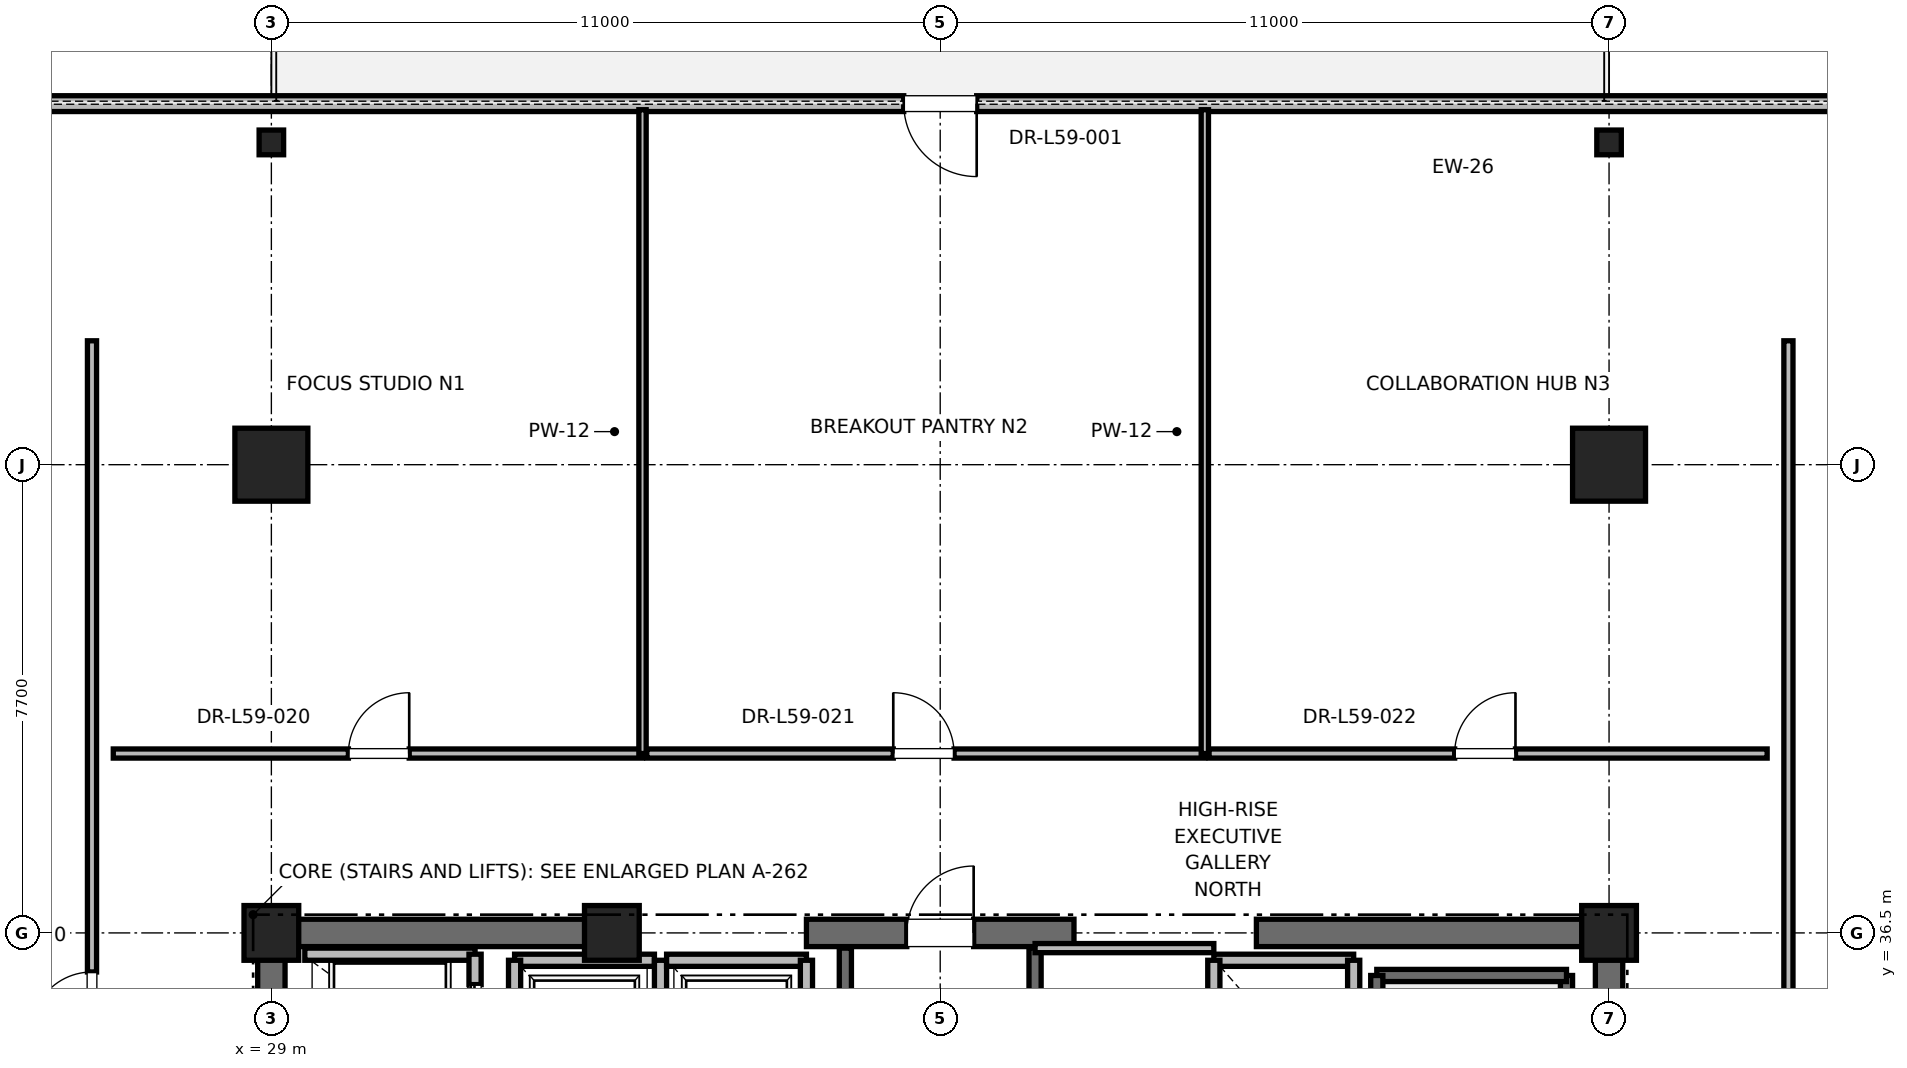
"""IFC4 building model, lengths in metres.
Left out: names, types, materials, properties, quantities, classifications, styles, units other than length and angle.
Written with IfcOpenShell. Run it as: python <this file> out.ifc"""

import sys

from ifc_helpers import new_model, si_unit, direction, frame, frame_2d, origin, origin_2d, place, context, subcontext, project, spatial, rectangle, i_section, extrude, element, fill, save


model = new_model("IFC4")
c1 = context("Model", 3, precision=1e-05, world=origin(), true_north=direction((0.0, 1.0)))
c2 = subcontext(c1, "Body", "Model", "MODEL_VIEW")
j1 = project(units=[si_unit("LENGTHUNIT", "METRE"), si_unit("PLANEANGLEUNIT", "RADIAN")], contexts=[c1])
p1 = place(None, origin())
s1 = spatial("IfcSite", under=j1, at=p1, CompositionType="ELEMENT")
p2 = place(p1, origin())
s2 = spatial("IfcBuilding", under=s1, at=p2, CompositionType="ELEMENT")
p3 = place(p2, frame((0.0, 0.0, 255.2)))
s3 = spatial("IfcBuildingStorey", under=s2, at=p3, CompositionType="ELEMENT", Elevation=255.2)
for number, where, z_axis, x_axis in (
    (1, (29.0, 44.2, 0.0), (0.0, 0.0, 1.0), (1.0, 0.0, 0.0)),
    (2, (51.0, 44.2, 0.0), (0.0, 0.0, 1.0), (1.0, 0.0, 0.0)),
):
    element("IfcColumn", number, at=place(p3, frame(where, z_axis=z_axis, x_axis=x_axis)), inside=s3, PredefinedType="COLUMN", context=c2, shape_type="SweptSolid", body=[
        extrude(rectangle(XDim=1.2, YDim=1.2, at=origin_2d()), origin(), (0.0, 0.0, 1.0), 4.0),
    ])
for number, where, z_axis, x_axis in (
    (3, (29.0, 49.5, 0.0), (0.0, 0.0, 1.0), (1.0, 0.0, 0.0)),
    (4, (51.0, 49.5, 0.0), (0.0, 0.0, 1.0), (1.0, 0.0, 0.0)),
):
    element("IfcColumn", number, at=place(p3, frame(where, z_axis=z_axis, x_axis=x_axis)), inside=s3, PredefinedType="COLUMN", context=c2, shape_type="SweptSolid", body=[
        extrude(i_section(OverallWidth=0.403, OverallDepth=0.406, WebThickness=0.027, FlangeThickness=0.043, FilletRadius=0.015, at=origin_2d()), origin(), (0.0, 0.0, 1.0), 4.0),
    ])
for number, where, z_axis, x_axis in (
    (5, (29.0, 36.5, 0.0), (0.0, 0.0, 1.0), (1.0, 0.0, 0.0)),
    (6, (51.0, 36.5, 0.0), (0.0, 0.0, 1.0), (1.0, 0.0, 0.0)),
    (7, (34.6, 36.5, 0.0), (0.0, 0.0, 1.0), (1.0, 0.0, 0.0)),
):
    element("IfcColumn", number, at=place(p3, frame(where, z_axis=z_axis, x_axis=x_axis)), inside=s3, PredefinedType="PILASTER", context=c2, shape_type="SweptSolid", body=[
        extrude(rectangle(XDim=0.9, YDim=0.9, at=origin_2d()), origin(), (0.0, 0.0, 1.0), 4.0),
    ])
p4 = place(p3, frame((29.0, 36.5, 0.0), z_axis=(0.0, 0.0, 1.0), x_axis=(1.0, 0.0, 0.0)))
e8 = element("IfcWall", 8, at=p4, inside=s3, PredefinedType="SHEAR", context=c2, shape_type="SweptSolid", body=[
    extrude(rectangle(XDim=5.8, YDim=0.45, at=frame_2d((2.9, 0.0))), origin(), (0.0, 0.0, 1.0), 3.785),
])
p5 = place(p3, frame((37.8, 36.5, 0.0), z_axis=(0.0, 0.0, 1.0), x_axis=(1.0, 0.0, 0.0)))
e9 = element("IfcWall", 9, at=p5, inside=s3, PredefinedType="SHEAR", context=c2, shape_type="SweptSolid", body=[
    extrude(rectangle(XDim=4.4, YDim=0.45, at=frame_2d((2.2, 0.0))), origin(), (0.0, 0.0, 1.0), 3.785),
])
p6 = place(p5, frame((1.65, 0.0, 0.0)))
e10 = element("IfcOpeningElement", 10, at=p6, cuts=e9, PredefinedType="OPENING", context=c2, shape_type="SweptSolid", body=[
    extrude(rectangle(XDim=1.1, YDim=2.15, at=frame_2d((0.55, 1.075))), frame((0.0, 0.225, 0.0), z_axis=(0.0, -1.0, 0.0), x_axis=(1.0, 0.0, 0.0)), (0.0, 0.0, 1.0), 0.45),
])
for number, where, z_axis, x_axis in (
    (11, (45.2, 36.5, 0.0), (0.0, 0.0, 1.0), (1.0, 0.0, 0.0)),
    (12, (29.0, 30.7, 0.0), (0.0, 0.0, 1.0), (0.0, 1.0, 0.0)),
):
    element("IfcWall", number, at=place(p3, frame(where, z_axis=z_axis, x_axis=x_axis)), inside=s3, PredefinedType="SHEAR", context=c2, shape_type="SweptSolid", body=[
        extrude(rectangle(XDim=5.8, YDim=0.45, at=frame_2d((2.9, 0.0))), origin(), (0.0, 0.0, 1.0), 3.785),
    ])
p7 = place(p3, frame((51.0, 27.7, 0.0), z_axis=(0.0, 0.0, 1.0), x_axis=(0.0, 1.0, 0.0)))
e13 = element("IfcWall", 13, at=p7, inside=s3, PredefinedType="SHEAR", context=c2, shape_type="SweptSolid", body=[
    extrude(rectangle(XDim=8.8, YDim=0.45, at=frame_2d((4.4, 0.0))), origin(), (0.0, 0.0, 1.0), 3.785),
])
p8 = place(p3, frame((62.396, 50.138, 0.0), z_axis=(0.0, 0.0, 1.0), x_axis=(-1.0, 0.0, 0.0)))
e14 = element("IfcWall", 14, at=p8, inside=s3, PredefinedType="PARAPET", context=c2, shape_type="SweptSolid", body=[
    extrude(rectangle(XDim=44.792, YDim=0.26, at=frame_2d((22.396, 0.0))), origin(), (0.0, 0.0, 1.0), 3.785),
])
p9 = place(p8, frame((4.2, 0.0, 0.85)))
e15 = element("IfcOpeningElement", 15, at=p9, cuts=e14, PredefinedType="OPENING", context=c2, shape_type="SweptSolid", body=[
    extrude(rectangle(XDim=1.6, YDim=2.1, at=frame_2d((0.8, 1.05))), frame((0.0, 0.13, 0.0), z_axis=(0.0, -1.0, 0.0), x_axis=(1.0, 0.0, 0.0)), (0.0, 0.0, 1.0), 0.26),
])
p10 = place(p8, frame((21.796, 0.0, 0.0)))
e16 = element("IfcOpeningElement", 16, at=p10, cuts=e14, PredefinedType="OPENING", context=c2, shape_type="SweptSolid", body=[
    extrude(rectangle(XDim=1.2, YDim=2.2, at=frame_2d((0.6, 1.1))), frame((0.0, 0.13, 0.0), z_axis=(0.0, -1.0, 0.0), x_axis=(1.0, 0.0, 0.0)), (0.0, 0.0, 1.0), 0.26),
])
p11 = place(p8, frame((38.993, 0.0, 0.85)))
e17 = element("IfcOpeningElement", 17, at=p11, cuts=e14, PredefinedType="OPENING", context=c2, shape_type="SweptSolid", body=[
    extrude(rectangle(XDim=1.6, YDim=2.1, at=frame_2d((0.8, 1.05))), frame((0.0, 0.13, 0.0), z_axis=(0.0, -1.0, 0.0), x_axis=(1.0, 0.0, 0.0)), (0.0, 0.0, 1.0), 0.26),
])
p12 = place(p3, frame((50.3, 27.65, 0.0), z_axis=(0.0, 0.0, 1.0), x_axis=(0.0, 1.0, 0.0)))
e18 = element("IfcWall", 18, at=p12, inside=s3, PredefinedType="SOLIDWALL", context=c2, shape_type="SweptSolid", body=[
    extrude(rectangle(XDim=8.15, YDim=0.2, at=frame_2d((4.075, 0.0))), origin(), (0.0, 0.0, 1.0), 3.785),
])
p13 = place(p3, frame((47.18, 35.8, 0.0), z_axis=(0.0, 0.0, 1.0), x_axis=(1.0, 0.0, 0.0)))
e19 = element("IfcWall", 19, at=p13, inside=s3, PredefinedType="SOLIDWALL", context=c2, shape_type="SweptSolid", body=[
    extrude(rectangle(XDim=3.12, YDim=0.2, at=frame_2d((1.56, 0.0))), origin(), (0.0, 0.0, 1.0), 3.785),
])
p14 = place(p3, frame((47.18, 27.62, 0.0), z_axis=(0.0, 0.0, 1.0), x_axis=(0.0, 1.0, 0.0)))
e20 = element("IfcWall", 20, at=p14, inside=s3, PredefinedType="SOLIDWALL", context=c2, shape_type="SweptSolid", body=[
    extrude(rectangle(XDim=8.18, YDim=0.2, at=frame_2d((4.09, 0.0))), origin(), (0.0, 0.0, 1.0), 3.785),
])
p15 = place(p3, frame((38.44, 27.38, 0.0), z_axis=(0.0, 0.0, 1.0), x_axis=(0.0, 1.0, 0.0)))
e21 = element("IfcWall", 21, at=p15, inside=s3, PredefinedType="SOLIDWALL", context=c2, shape_type="SweptSolid", body=[
    extrude(rectangle(XDim=8.87, YDim=0.2, at=frame_2d((4.435, 0.0))), origin(), (0.0, 0.0, 1.0), 3.785),
])
p16 = place(p3, frame((41.56, 27.68, 0.0), z_axis=(0.0, 0.0, 1.0), x_axis=(0.0, 1.0, 0.0)))
e22 = element("IfcWall", 22, at=p16, inside=s3, PredefinedType="SOLIDWALL", context=c2, shape_type="SweptSolid", body=[
    extrude(rectangle(XDim=8.57, YDim=0.2, at=frame_2d((4.285, 0.0))), origin(), (0.0, 0.0, 1.0), 3.785),
])
p17 = place(p3, frame((32.35, 36.15, 0.0), z_axis=(0.0, 0.0, 1.0), x_axis=(-1.0, 0.0, 0.0)))
e23 = element("IfcWall", 23, at=p17, inside=s3, PredefinedType="SOLIDWALL", context=c2, shape_type="SweptSolid", body=[
    extrude(rectangle(XDim=2.8, YDim=0.2, at=frame_2d((1.4, 0.0))), origin(), (0.0, 0.0, 1.0), 3.148),
])
p18 = place(p3, frame((32.35, 34.05, 0.0), z_axis=(0.0, 0.0, 1.0), x_axis=(0.0, 1.0, 0.0)))
e24 = element("IfcWall", 24, at=p18, inside=s3, PredefinedType="SOLIDWALL", context=c2, shape_type="SweptSolid", body=[
    extrude(rectangle(XDim=2.1, YDim=0.2, at=frame_2d((1.05, 0.0))), origin(), (0.0, 0.0, 1.0), 3.785),
])
p19 = place(p18, frame((0.5, 0.0, 0.0)))
e25 = element("IfcOpeningElement", 25, at=p19, cuts=e24, PredefinedType="OPENING", context=c2, shape_type="SweptSolid", body=[
    extrude(rectangle(XDim=1.1, YDim=2.2, at=frame_2d((0.55, 1.1))), frame((0.0, 0.1, 0.0), z_axis=(0.0, -1.0, 0.0), x_axis=(1.0, 0.0, 0.0)), (0.0, 0.0, 1.0), 0.2),
])
p20 = place(p3, frame((35.3, 36.05, 0.0), z_axis=(0.0, 0.0, 1.0), x_axis=(-1.0, 0.0, 0.0)))
e26 = element("IfcWall", 26, at=p20, inside=s3, PredefinedType="SOLIDWALL", context=c2, shape_type="SweptSolid", body=[
    extrude(rectangle(XDim=2.3, YDim=0.2, at=frame_2d((1.15, 0.0))), origin(), (0.0, 0.0, 1.0), 2.865),
])
p21 = place(p3, frame((33.0, 36.05, 0.0), z_axis=(0.0, 0.0, 1.0), x_axis=(0.0, -1.0, 0.0)))
e27 = element("IfcWall", 27, at=p21, inside=s3, PredefinedType="SOLIDWALL", context=c2, shape_type="SweptSolid", body=[
    extrude(rectangle(XDim=2.6, YDim=0.2, at=frame_2d((1.3, 0.0))), origin(), (0.0, 0.0, 1.0), 3.785),
])
p22 = place(p3, frame((35.4, 33.45, 0.0), z_axis=(0.0, 0.0, 1.0), x_axis=(0.0, 1.0, 0.0)))
e28 = element("IfcWall", 28, at=p22, inside=s3, PredefinedType="SOLIDWALL", context=c2, shape_type="SweptSolid", body=[
    extrude(rectangle(XDim=2.6, YDim=0.2, at=frame_2d((1.3, 0.0))), origin(), (0.0, 0.0, 1.0), 2.865),
])
p23 = place(p3, frame((37.8, 36.05, 0.0), z_axis=(0.0, 0.0, 1.0), x_axis=(-1.0, 0.0, 0.0)))
e29 = element("IfcWall", 29, at=p23, inside=s3, PredefinedType="SOLIDWALL", context=c2, shape_type="SweptSolid", body=[
    extrude(rectangle(XDim=2.3, YDim=0.2, at=frame_2d((1.15, 0.0))), origin(), (0.0, 0.0, 1.0), 2.865),
])
p24 = place(p3, frame((37.8, 33.45, 0.0), z_axis=(0.0, 0.0, 1.0), x_axis=(0.0, 1.0, 0.0)))
e30 = element("IfcWall", 30, at=p24, inside=s3, PredefinedType="SOLIDWALL", context=c2, shape_type="SweptSolid", body=[
    extrude(rectangle(XDim=2.6, YDim=0.2, at=frame_2d((1.3, 0.0))), origin(), (0.0, 0.0, 1.0), 2.865),
])
p25 = place(p3, frame((46.8, 36.05, 0.0), z_axis=(0.0, 0.0, 1.0), x_axis=(-1.0, 0.0, 0.0)))
e31 = element("IfcWall", 31, at=p25, inside=s3, PredefinedType="SOLIDWALL", context=c2, shape_type="SweptSolid", body=[
    extrude(rectangle(XDim=2.3, YDim=0.2, at=frame_2d((1.15, 0.0))), origin(), (0.0, 0.0, 1.0), 2.865),
])
p26 = place(p3, frame((44.5, 36.05, 0.0), z_axis=(0.0, 0.0, 1.0), x_axis=(0.0, -1.0, 0.0)))
e32 = element("IfcWall", 32, at=p26, inside=s3, PredefinedType="SOLIDWALL", context=c2, shape_type="SweptSolid", body=[
    extrude(rectangle(XDim=2.6, YDim=0.2, at=frame_2d((1.3, 0.0))), origin(), (0.0, 0.0, 1.0), 2.865),
])
p27 = place(p3, frame((46.8, 33.45, 0.0), z_axis=(0.0, 0.0, 1.0), x_axis=(0.0, 1.0, 0.0)))
e33 = element("IfcWall", 33, at=p27, inside=s3, PredefinedType="SOLIDWALL", context=c2, shape_type="SweptSolid", body=[
    extrude(rectangle(XDim=2.6, YDim=0.2, at=frame_2d((1.3, 0.0))), origin(), (0.0, 0.0, 1.0), 3.785),
])
p28 = place(p3, frame((41.56, 36.25, 0.0), z_axis=(0.0, 0.0, 1.0), x_axis=(1.0, 0.0, 0.0)))
e34 = element("IfcWall", 34, at=p28, inside=s3, PredefinedType="PARTITIONING", context=c2, shape_type="SweptSolid", body=[
    extrude(rectangle(XDim=2.94, YDim=0.15, at=frame_2d((1.47, 0.0))), origin(), (0.0, 0.0, 1.0), 2.85),
])
p29 = place(p3, frame((26.4, 39.45, 0.0), z_axis=(0.0, 0.0, 1.0), x_axis=(1.0, 0.0, 0.0)))
e35 = element("IfcWall", 35, at=p29, inside=s3, PredefinedType="PARTITIONING", context=c2, shape_type="SweptSolid", body=[
    extrude(rectangle(XDim=8.704, YDim=0.15, at=frame_2d((4.352, 0.0))), origin(), (0.0, 0.0, 1.0), 2.85),
])
p30 = place(p29, frame((3.867, 0.0, 0.0)))
e36 = element("IfcOpeningElement", 36, at=p30, cuts=e35, PredefinedType="OPENING", context=c2, shape_type="SweptSolid", body=[
    extrude(rectangle(XDim=1.0, YDim=2.15, at=frame_2d((0.5, 1.075))), frame((0.0, 0.075, 0.0), z_axis=(0.0, -1.0, 0.0), x_axis=(1.0, 0.0, 0.0)), (0.0, 0.0, 1.0), 0.15),
])
p31 = place(p3, frame((35.104, 39.45, 0.0), z_axis=(0.0, 0.0, 1.0), x_axis=(0.0, 1.0, 0.0)))
e37 = element("IfcWall", 37, at=p31, inside=s3, PredefinedType="PARTITIONING", context=c2, shape_type="SweptSolid", body=[
    extrude(rectangle(XDim=10.588, YDim=0.12, at=frame_2d((5.294, 0.0))), origin(), (0.0, 0.0, 1.0), 2.415),
])
p32 = place(p3, frame((35.174, 39.45, 0.0), z_axis=(0.0, 0.0, 1.0), x_axis=(1.0, 0.0, 0.0)))
e38 = element("IfcWall", 38, at=p32, inside=s3, PredefinedType="PARTITIONING", context=c2, shape_type="SweptSolid", body=[
    extrude(rectangle(XDim=9.178, YDim=0.15, at=frame_2d((4.589, 0.0))), origin(), (0.0, 0.0, 1.0), 2.85),
])
p33 = place(p32, frame((4.054, 0.0, 0.0)))
e39 = element("IfcOpeningElement", 39, at=p33, cuts=e38, PredefinedType="OPENING", context=c2, shape_type="SweptSolid", body=[
    extrude(rectangle(XDim=1.0, YDim=2.15, at=frame_2d((0.5, 1.075))), frame((0.0, 0.075, 0.0), z_axis=(0.0, -1.0, 0.0), x_axis=(1.0, 0.0, 0.0)), (0.0, 0.0, 1.0), 0.15),
])
p34 = place(p3, frame((44.352, 39.45, 0.0), z_axis=(0.0, 0.0, 1.0), x_axis=(0.0, 1.0, 0.0)))
e40 = element("IfcWall", 40, at=p34, inside=s3, PredefinedType="PARTITIONING", context=c2, shape_type="SweptSolid", body=[
    extrude(rectangle(XDim=10.588, YDim=0.12, at=frame_2d((5.294, 0.0))), origin(), (0.0, 0.0, 1.0), 2.415),
])
p35 = place(p3, frame((44.422, 39.45, 0.0), z_axis=(0.0, 0.0, 1.0), x_axis=(1.0, 0.0, 0.0)))
e41 = element("IfcWall", 41, at=p35, inside=s3, PredefinedType="PARTITIONING", context=c2, shape_type="SweptSolid", body=[
    extrude(rectangle(XDim=9.178, YDim=0.15, at=frame_2d((4.589, 0.0))), origin(), (0.0, 0.0, 1.0), 2.85),
])
p36 = place(p35, frame((4.039, 0.0, 0.0)))
e42 = element("IfcOpeningElement", 42, at=p36, cuts=e41, PredefinedType="OPENING", context=c2, shape_type="SweptSolid", body=[
    extrude(rectangle(XDim=1.0, YDim=2.15, at=frame_2d((0.5, 1.075))), frame((0.0, 0.075, 0.0), z_axis=(0.0, -1.0, 0.0), x_axis=(1.0, 0.0, 0.0)), (0.0, 0.0, 1.0), 0.15),
])
p37 = place(p3, frame((26.05, 34.315, 0.0), z_axis=(0.0, 0.0, 1.0), x_axis=(0.0, 1.0, 0.0)))
e43 = element("IfcWall", 43, at=p37, inside=s3, PredefinedType="PARTITIONING", context=c2, shape_type="SweptSolid", body=[
    extrude(rectangle(XDim=11.922, YDim=0.15, at=frame_2d((5.961, 0.0))), origin(), (0.0, 0.0, 1.0), 2.85),
])
p38 = place(p37, frame((0.542, 0.0, 0.0)))
e44 = element("IfcOpeningElement", 44, at=p38, cuts=e43, PredefinedType="OPENING", context=c2, shape_type="SweptSolid", body=[
    extrude(rectangle(XDim=1.0, YDim=2.15, at=frame_2d((0.5, 1.075))), frame((0.0, 0.075, 0.0), z_axis=(0.0, -1.0, 0.0), x_axis=(1.0, 0.0, 0.0)), (0.0, 0.0, 1.0), 0.15),
])
p39 = place(p3, frame((53.95, 8.762, 0.0), z_axis=(0.0, 0.0, 1.0), x_axis=(0.0, 1.0, 0.0)))
e45 = element("IfcWall", 45, at=p39, inside=s3, PredefinedType="PARTITIONING", context=c2, shape_type="SweptSolid", body=[
    extrude(rectangle(XDim=37.475, YDim=0.15, at=frame_2d((18.738, 0.0))), origin(), (0.0, 0.0, 1.0), 2.85),
])
p40 = place(p39, frame((18.238, 0.0, 0.0)))
e46 = element("IfcOpeningElement", 46, at=p40, cuts=e45, PredefinedType="OPENING", context=c2, shape_type="SweptSolid", body=[
    extrude(rectangle(XDim=1.0, YDim=2.15, at=frame_2d((0.5, 1.075))), frame((0.0, 0.075, 0.0), z_axis=(0.0, -1.0, 0.0), x_axis=(1.0, 0.0, 0.0)), (0.0, 0.0, 1.0), 0.15),
])
p41 = place(p10, origin())
e47 = element("IfcDoor", 47, at=p41, inside=s3, OperationType="SINGLE_SWING_LEFT", PredefinedType="DOOR", context=c2, shape_type="SweptSolid", body=[
    extrude(rectangle(XDim=1.2, YDim=2.2, at=frame_2d((0.6, 1.1))), frame((0.0, 0.025, 0.0), z_axis=(0.0, -1.0, 0.0), x_axis=(1.0, 0.0, 0.0)), (0.0, 0.0, 1.0), 0.05),
])
fill(e16, e47)
p42 = place(p6, origin())
e48 = element("IfcDoor", 48, at=p42, inside=s3, OperationType="SINGLE_SWING_RIGHT", PredefinedType="DOOR", context=c2, shape_type="SweptSolid", body=[
    extrude(rectangle(XDim=1.1, YDim=2.15, at=frame_2d((0.55, 1.075))), frame((0.0, 0.025, 0.0), z_axis=(0.0, -1.0, 0.0), x_axis=(1.0, 0.0, 0.0)), (0.0, 0.0, 1.0), 0.05),
])
fill(e10, e48)
p43 = place(p19, origin())
e49 = element("IfcDoor", 49, at=p43, inside=s3, OperationType="SLIDING_TO_RIGHT", PredefinedType="DOOR", context=c2, shape_type="SweptSolid", body=[
    extrude(rectangle(XDim=1.1, YDim=2.2, at=frame_2d((0.55, 1.1))), frame((0.0, 0.025, 0.0), z_axis=(0.0, -1.0, 0.0), x_axis=(1.0, 0.0, 0.0)), (0.0, 0.0, 1.0), 0.05),
])
fill(e25, e49)
p44 = place(p30, origin())
e50 = element("IfcDoor", 50, at=p44, inside=s3, OperationType="SINGLE_SWING_RIGHT", PredefinedType="DOOR", context=c2, shape_type="SweptSolid", body=[
    extrude(rectangle(XDim=1.0, YDim=2.15, at=frame_2d((0.5, 1.075))), frame((0.0, 0.025, 0.0), z_axis=(0.0, -1.0, 0.0), x_axis=(1.0, 0.0, 0.0)), (0.0, 0.0, 1.0), 0.05),
])
fill(e36, e50)
p45 = place(p33, origin())
e51 = element("IfcDoor", 51, at=p45, inside=s3, OperationType="SINGLE_SWING_LEFT", PredefinedType="DOOR", context=c2, shape_type="SweptSolid", body=[
    extrude(rectangle(XDim=1.0, YDim=2.15, at=frame_2d((0.5, 1.075))), frame((0.0, 0.025, 0.0), z_axis=(0.0, -1.0, 0.0), x_axis=(1.0, 0.0, 0.0)), (0.0, 0.0, 1.0), 0.05),
])
fill(e39, e51)
p46 = place(p36, origin())
e52 = element("IfcDoor", 52, at=p46, inside=s3, OperationType="SINGLE_SWING_RIGHT", PredefinedType="DOOR", context=c2, shape_type="SweptSolid", body=[
    extrude(rectangle(XDim=1.0, YDim=2.15, at=frame_2d((0.5, 1.075))), frame((0.0, 0.025, 0.0), z_axis=(0.0, -1.0, 0.0), x_axis=(1.0, 0.0, 0.0)), (0.0, 0.0, 1.0), 0.05),
])
fill(e42, e52)
p47 = place(p38, origin())
e53 = element("IfcDoor", 53, at=p47, inside=s3, OperationType="SINGLE_SWING_LEFT", PredefinedType="DOOR", context=c2, shape_type="SweptSolid", body=[
    extrude(rectangle(XDim=1.0, YDim=2.15, at=frame_2d((0.5, 1.075))), frame((0.0, 0.025, 0.0), z_axis=(0.0, -1.0, 0.0), x_axis=(1.0, 0.0, 0.0)), (0.0, 0.0, 1.0), 0.05),
])
fill(e44, e53)
save(model, sys.argv[1])
